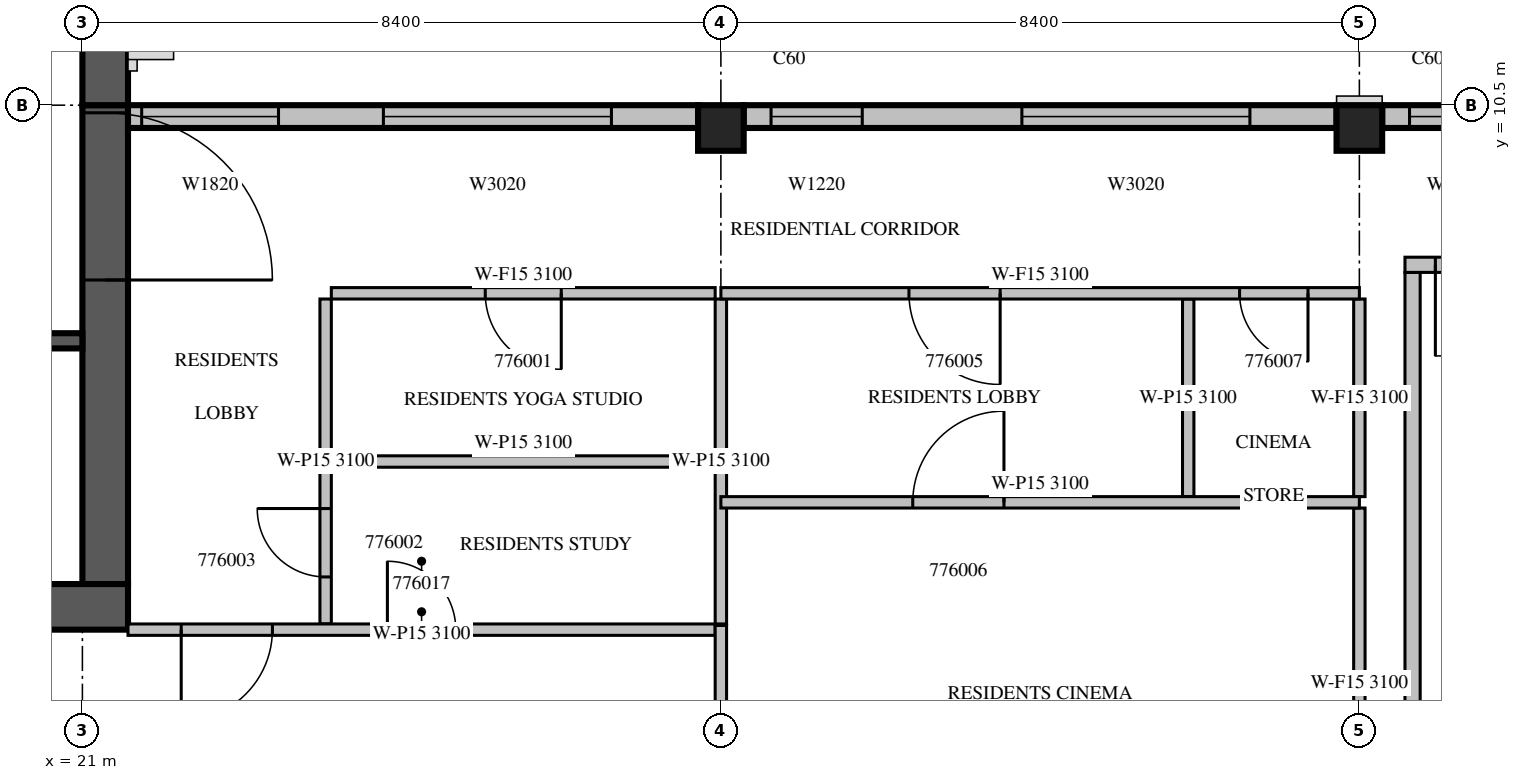
"""IFC4 building model, lengths in metres.
Left out: names, types, materials, properties, quantities, classifications, styles, units other than length and angle.
Written with IfcOpenShell. Run it as: python <this file> out.ifc"""

import sys

from ifc_helpers import new_model, si_unit, direction, frame, frame_2d, origin, origin_2d, place, context, subcontext, project, spatial, rectangle, extrude, source, transform, mapped, element, fill, save


model = new_model("IFC4")
c1 = context("Model", 3, precision=1e-05, world=origin(), true_north=direction((0.0, 1.0)))
c2 = subcontext(c1, "Body", "Model", "MODEL_VIEW")
j1 = project(units=[si_unit("LENGTHUNIT", "METRE"), si_unit("PLANEANGLEUNIT", "RADIAN")], contexts=[c1])
p1 = place(None, origin())
s1 = spatial("IfcSite", under=j1, at=p1, CompositionType="ELEMENT")
p2 = place(p1, origin())
s2 = spatial("IfcBuilding", under=s1, at=p2, CompositionType="ELEMENT")
p3 = place(p2, frame((0.0, 0.0, 326.5)))
s3 = spatial("IfcBuildingStorey", under=s2, at=p3, CompositionType="ELEMENT", Elevation=326.5)
m1 = source(origin(), c2, "Body", "SweptSolid", [
    extrude(rectangle(XDim=0.6, YDim=0.6, at=origin_2d()), origin(), (0.0, 0.0, 1.0), 3.5),
])
for number, where, z_axis, x_axis in (
    (1, (29.4, 10.2, 0.0), (0.0, 0.0, 1.0), (1.0, 0.0, 0.0)),
    (2, (37.8, 10.2, 0.0), (0.0, 0.0, 1.0), (1.0, 0.0, 0.0)),
):
    element("IfcColumn", number, at=place(p3, frame(where, z_axis=z_axis, x_axis=x_axis)), inside=s3, PredefinedType="COLUMN", context=c2, shape_type="MappedRepresentation", body=[
        mapped(m1, transform((0.0, 0.0, 0.0), scale=1.0)),
    ])
m2 = source(origin(), c2, "Body", "SweptSolid", [
    extrude(rectangle(XDim=6.3, YDim=0.6, at=frame_2d((3.15, 0.0))), origin(), (0.0, 0.0, 1.0), 3.5),
])
p4 = place(p3, frame((21.3, 4.2, 0.0), z_axis=(0.0, 0.0, 1.0), x_axis=(0.0, 1.0, 0.0)))
e3 = element("IfcWall", 3, at=p4, inside=s3, PredefinedType="SHEAR", context=c2, shape_type="MappedRepresentation", body=[
    mapped(m2, transform((0.0, 0.0, 0.0), scale=1.0)),
])
m3 = source(origin(), c2, "Body", "SweptSolid", [
    extrude(rectangle(XDim=2.2, YDim=2.1, at=frame_2d((1.1, 1.05))), frame((0.0, 0.31, 0.0), z_axis=(0.0, -1.0, 0.0), x_axis=(1.0, 0.0, 0.0)), (0.0, 0.0, 1.0), 0.62),
])
p5 = place(p4, frame((4.0, 0.0, 0.0)))
e4 = element("IfcOpeningElement", 4, at=p5, cuts=e3, PredefinedType="OPENING", context=c2, shape_type="MappedRepresentation", body=[
    mapped(m3, transform((0.0, 0.0, 0.0), scale=1.0)),
])
m4 = source(origin(), c2, "Body", "SweptSolid", [
    extrude(rectangle(XDim=17.4, YDim=0.6, at=frame_2d((8.7, 0.0))), origin(), (0.0, 0.0, 1.0), 3.5),
])
p6 = place(p3, frame((4.2, 3.9, 0.0), z_axis=(0.0, 0.0, 1.0), x_axis=(1.0, 0.0, 0.0)))
e5 = element("IfcWall", 5, at=p6, inside=s3, PredefinedType="SHEAR", context=c2, shape_type="MappedRepresentation", body=[
    mapped(m4, transform((0.0, 0.0, 0.0), scale=1.0)),
])
m5 = source(origin(), c2, "Body", "SweptSolid", [
    extrude(rectangle(XDim=0.9, YDim=2.1, at=frame_2d((0.45, 1.05))), frame((0.0, 0.31, 0.0), z_axis=(0.0, -1.0, 0.0), x_axis=(1.0, 0.0, 0.0)), (0.0, 0.0, 1.0), 0.62),
])
p7 = place(p6, frame((15.2, 0.0, 0.0)))
e6 = element("IfcOpeningElement", 6, at=p7, cuts=e5, PredefinedType="OPENING", context=c2, shape_type="MappedRepresentation", body=[
    mapped(m5, transform((0.0, 0.0, 0.0), scale=1.0)),
])
m6 = source(origin(), c2, "Body", "SweptSolid", [
    extrude(rectangle(XDim=10.5, YDim=0.6, at=frame_2d((5.25, 0.0))), origin(), (0.0, 0.0, 1.0), 3.5),
])
p8 = place(p3, frame((21.3, 10.5, 0.0), z_axis=(0.0, 0.0, 1.0), x_axis=(0.0, 1.0, 0.0)))
e7 = element("IfcWall", 7, at=p8, inside=s3, PredefinedType="SHEAR", context=c2, shape_type="MappedRepresentation", body=[
    mapped(m6, transform((0.0, 0.0, 0.0), scale=1.0)),
])
m7 = source(origin(), c2, "Body", "SweptSolid", [
    extrude(rectangle(XDim=1.2, YDim=2.4, at=frame_2d((0.6, 1.2))), frame((0.0, 0.31, 0.0), z_axis=(0.0, -1.0, 0.0), x_axis=(1.0, 0.0, 0.0)), (0.0, 0.0, 1.0), 0.62),
])
p9 = place(p8, frame((5.7, 0.0, 0.6)))
e8 = element("IfcOpeningElement", 8, at=p9, cuts=e7, PredefinedType="OPENING", context=c2, shape_type="MappedRepresentation", body=[
    mapped(m7, transform((0.0, 0.0, 0.0), scale=1.0)),
])
m8 = source(origin(), c2, "Body", "SweptSolid", [
    extrude(rectangle(XDim=7.8, YDim=0.3, at=frame_2d((3.9, 0.0))), origin(), (0.0, 0.0, 1.0), 3.1),
])
p10 = place(p3, frame((45.9, 10.35, 0.0), z_axis=(0.0, 0.0, 1.0), x_axis=(-1.0, 0.0, 0.0)))
e9 = element("IfcWall", 9, at=p10, inside=s3, PredefinedType="STANDARD", context=c2, shape_type="MappedRepresentation", body=[
    mapped(m8, transform((0.0, 0.0, 0.0), scale=1.0)),
])
m9 = source(origin(), c2, "Body", "SweptSolid", [
    extrude(rectangle(XDim=3.0, YDim=2.0, at=frame_2d((1.5, 1.0))), frame((0.0, 0.16, 0.0), z_axis=(0.0, -1.0, 0.0), x_axis=(1.0, 0.0, 0.0)), (0.0, 0.0, 1.0), 0.32),
])
p11 = place(p10, frame((1.14, 0.0, 0.6)))
e10 = element("IfcOpeningElement", 10, at=p11, cuts=e9, PredefinedType="OPENING", context=c2, shape_type="MappedRepresentation", body=[
    mapped(m9, transform((0.0, 0.0, 0.0), scale=1.0)),
])
m10 = source(origin(), c2, "Body", "SweptSolid", [
    extrude(rectangle(XDim=1.2, YDim=2.0, at=frame_2d((0.6, 1.0))), frame((0.0, 0.16, 0.0), z_axis=(0.0, -1.0, 0.0), x_axis=(1.0, 0.0, 0.0)), (0.0, 0.0, 1.0), 0.32),
])
p12 = place(p10, frame((6.24, 0.0, 0.6)))
e11 = element("IfcOpeningElement", 11, at=p12, cuts=e9, PredefinedType="OPENING", context=c2, shape_type="MappedRepresentation", body=[
    mapped(m10, transform((0.0, 0.0, 0.0), scale=1.0)),
])
p13 = place(p3, frame((37.5, 10.35, 0.0), z_axis=(0.0, 0.0, 1.0), x_axis=(-1.0, 0.0, 0.0)))
e12 = element("IfcWall", 12, at=p13, inside=s3, PredefinedType="STANDARD", context=c2, shape_type="MappedRepresentation", body=[
    mapped(m8, transform((0.0, 0.0, 0.0), scale=1.0)),
])
p14 = place(p13, frame((1.14, 0.0, 0.6)))
e13 = element("IfcOpeningElement", 13, at=p14, cuts=e12, PredefinedType="OPENING", context=c2, shape_type="MappedRepresentation", body=[
    mapped(m9, transform((0.0, 0.0, 0.0), scale=1.0)),
])
p15 = place(p13, frame((6.24, 0.0, 0.6)))
e14 = element("IfcOpeningElement", 14, at=p15, cuts=e12, PredefinedType="OPENING", context=c2, shape_type="MappedRepresentation", body=[
    mapped(m10, transform((0.0, 0.0, 0.0), scale=1.0)),
])
p16 = place(p3, frame((29.1, 10.35, 0.0), z_axis=(0.0, 0.0, 1.0), x_axis=(-1.0, 0.0, 0.0)))
e15 = element("IfcWall", 15, at=p16, inside=s3, PredefinedType="STANDARD", context=c2, shape_type="SweptSolid", body=[
    extrude(rectangle(XDim=7.5, YDim=0.3, at=frame_2d((3.75, 0.0))), origin(), (0.0, 0.0, 1.0), 3.1),
])
p17 = place(p16, frame((1.14, 0.0, 0.6)))
e16 = element("IfcOpeningElement", 16, at=p17, cuts=e15, PredefinedType="OPENING", context=c2, shape_type="MappedRepresentation", body=[
    mapped(m9, transform((0.0, 0.0, 0.0), scale=1.0)),
])
m11 = source(origin(), c2, "Body", "SweptSolid", [
    extrude(rectangle(XDim=1.8, YDim=2.0, at=frame_2d((0.9, 1.0))), frame((0.0, 0.16, 0.0), z_axis=(0.0, -1.0, 0.0), x_axis=(1.0, 0.0, 0.0)), (0.0, 0.0, 1.0), 0.32),
])
p18 = place(p16, frame((5.52, 0.0, 0.6)))
e17 = element("IfcOpeningElement", 17, at=p18, cuts=e15, PredefinedType="OPENING", context=c2, shape_type="MappedRepresentation", body=[
    mapped(m11, transform((0.0, 0.0, 0.0), scale=1.0)),
])
m12 = source(origin(), c2, "Body", "SweptSolid", [
    extrude(rectangle(XDim=7.2, YDim=0.2, at=frame_2d((3.6, 0.0))), origin(), (0.0, 0.0, 1.0), 3.1),
])
p19 = place(p3, frame((13.8, 7.4, 0.0), z_axis=(0.0, 0.0, 1.0), x_axis=(1.0, 0.0, 0.0)))
e18 = element("IfcWall", 18, at=p19, inside=s3, PredefinedType="SOLIDWALL", context=c2, shape_type="MappedRepresentation", body=[
    mapped(m12, transform((0.0, 0.0, 0.0), scale=1.0)),
])
m13 = source(origin(), c2, "Body", "SweptSolid", [
    extrude(rectangle(XDim=0.9, YDim=2.1, at=frame_2d((0.45, 1.05))), frame((0.0, 0.11, 0.0), z_axis=(0.0, -1.0, 0.0), x_axis=(1.0, 0.0, 0.0)), (0.0, 0.0, 1.0), 0.22),
])
p20 = place(p19, frame((0.75, 0.0, 0.0)))
e19 = element("IfcOpeningElement", 19, at=p20, cuts=e18, PredefinedType="OPENING", context=c2, shape_type="MappedRepresentation", body=[
    mapped(m13, transform((0.0, 0.0, 0.0), scale=1.0)),
])
p21 = place(p19, frame((3.15, 0.0, 0.0)))
e20 = element("IfcOpeningElement", 20, at=p21, cuts=e18, PredefinedType="OPENING", context=c2, shape_type="MappedRepresentation", body=[
    mapped(m13, transform((0.0, 0.0, 0.0), scale=1.0)),
])
p22 = place(p19, frame((5.55, 0.0, 0.0)))
e21 = element("IfcOpeningElement", 21, at=p22, cuts=e18, PredefinedType="OPENING", context=c2, shape_type="MappedRepresentation", body=[
    mapped(m13, transform((0.0, 0.0, 0.0), scale=1.0)),
])
m14 = source(origin(), c2, "Body", "SweptSolid", [
    extrude(rectangle(XDim=8.0, YDim=0.2, at=frame_2d((4.0, 0.0))), origin(), (0.0, 0.0, 1.0), 3.1),
])
p23 = place(p3, frame((38.5, 0.3, 0.0), z_axis=(0.0, 0.0, 1.0), x_axis=(0.0, 1.0, 0.0)))
e22 = element("IfcWall", 22, at=p23, inside=s3, PredefinedType="PARTITIONING", context=c2, shape_type="MappedRepresentation", body=[
    mapped(m14, transform((0.0, 0.0, 0.0), scale=1.0)),
])
m15 = source(origin(), c2, "Body", "SweptSolid", [
    extrude(rectangle(XDim=5.45, YDim=0.2, at=frame_2d((2.725, 0.0))), origin(), (0.0, 0.0, 1.0), 3.1),
])
p24 = place(p3, frame((38.4, 8.4, 0.0), z_axis=(0.0, 0.0, 1.0), x_axis=(1.0, 0.0, 0.0)))
e23 = element("IfcWall", 23, at=p24, inside=s3, PredefinedType="PARTITIONING", context=c2, shape_type="MappedRepresentation", body=[
    mapped(m15, transform((0.0, 0.0, 0.0), scale=1.0)),
])
m16 = source(origin(), c2, "Body", "SweptSolid", [
    extrude(rectangle(XDim=1.2, YDim=2.1, at=frame_2d((0.6, 1.05))), frame((0.0, 0.11, 0.0), z_axis=(0.0, -1.0, 0.0), x_axis=(1.0, 0.0, 0.0)), (0.0, 0.0, 1.0), 0.22),
])
p25 = place(p24, frame((0.4, 0.0, 0.0)))
e24 = element("IfcOpeningElement", 24, at=p25, cuts=e23, PredefinedType="OPENING", context=c2, shape_type="MappedRepresentation", body=[
    mapped(m16, transform((0.0, 0.0, 0.0), scale=1.0)),
])
p26 = place(p24, frame((3.25, 0.0, 0.0)))
e25 = element("IfcOpeningElement", 25, at=p26, cuts=e23, PredefinedType="OPENING", context=c2, shape_type="MappedRepresentation", body=[
    mapped(m13, transform((0.0, 0.0, 0.0), scale=1.0)),
])
m17 = source(origin(), c2, "Body", "SweptSolid", [
    extrude(rectangle(XDim=4.275, YDim=0.15, at=frame_2d((2.138, 0.0))), origin(), (0.0, 0.0, 1.0), 3.1),
])
p27 = place(p3, frame((24.2, 7.95, 0.0), z_axis=(0.0, 0.0, 1.0), x_axis=(0.0, -1.0, 0.0)))
e26 = element("IfcWall", 26, at=p27, inside=s3, PredefinedType="PARTITIONING", context=c2, shape_type="MappedRepresentation", body=[
    mapped(m17, transform((0.0, 0.0, 0.0), scale=1.0)),
])
m18 = source(origin(), c2, "Body", "SweptSolid", [
    extrude(rectangle(XDim=0.9, YDim=2.1, at=frame_2d((0.45, 1.05))), frame((0.0, 0.085, 0.0), z_axis=(0.0, -1.0, 0.0), x_axis=(1.0, 0.0, 0.0)), (0.0, 0.0, 1.0), 0.17),
])
p28 = place(p27, frame((2.756, 0.0, 0.0)))
e27 = element("IfcOpeningElement", 27, at=p28, cuts=e26, PredefinedType="OPENING", context=c2, shape_type="MappedRepresentation", body=[
    mapped(m18, transform((0.0, 0.0, 0.0), scale=1.0)),
])
p29 = place(p3, frame((29.4, 3.675, 0.0), z_axis=(0.0, 0.0, 1.0), x_axis=(0.0, 1.0, 0.0)))
e28 = element("IfcWall", 28, at=p29, inside=s3, PredefinedType="PARTITIONING", context=c2, shape_type="MappedRepresentation", body=[
    mapped(m17, transform((0.0, 0.0, 0.0), scale=1.0)),
])
m19 = source(origin(), c2, "Body", "SweptSolid", [
    extrude(rectangle(XDim=5.05, YDim=0.15, at=frame_2d((2.525, 0.0))), origin(), (0.0, 0.0, 1.0), 3.1),
])
p30 = place(p3, frame((29.325, 8.025, 0.0), z_axis=(0.0, 0.0, 1.0), x_axis=(-1.0, 0.0, 0.0)))
e29 = element("IfcWall", 29, at=p30, inside=s3, PredefinedType="PARTITIONING", context=c2, shape_type="MappedRepresentation", body=[
    mapped(m19, transform((0.0, 0.0, 0.0), scale=1.0)),
])
m20 = source(origin(), c2, "Body", "SweptSolid", [
    extrude(rectangle(XDim=1.0, YDim=2.1, at=frame_2d((0.5, 1.05))), frame((0.0, 0.085, 0.0), z_axis=(0.0, -1.0, 0.0), x_axis=(1.0, 0.0, 0.0)), (0.0, 0.0, 1.0), 0.17),
])
p31 = place(p30, frame((2.025, 0.0, 0.0)))
e30 = element("IfcOpeningElement", 30, at=p31, cuts=e29, PredefinedType="OPENING", context=c2, shape_type="MappedRepresentation", body=[
    mapped(m20, transform((0.0, 0.0, 0.0), scale=1.0)),
])
p32 = place(p3, frame((29.325, 5.812, 0.0), z_axis=(0.0, 0.0, 1.0), x_axis=(-1.0, 0.0, 0.0)))
e31 = element("IfcWall", 31, at=p32, inside=s3, PredefinedType="PARTITIONING", context=c2, shape_type="MappedRepresentation", body=[
    mapped(m19, transform((0.0, 0.0, 0.0), scale=1.0)),
])
m21 = source(origin(), c2, "Body", "SweptSolid", [
    extrude(rectangle(XDim=7.725, YDim=0.15, at=frame_2d((3.862, 0.0))), origin(), (0.0, 0.0, 1.0), 3.1),
])
p33 = place(p3, frame((21.6, 3.6, 0.0), z_axis=(0.0, 0.0, 1.0), x_axis=(1.0, 0.0, 0.0)))
e32 = element("IfcWall", 32, at=p33, inside=s3, PredefinedType="PARTITIONING", context=c2, shape_type="MappedRepresentation", body=[
    mapped(m21, transform((0.0, 0.0, 0.0), scale=1.0)),
])
m22 = source(origin(), c2, "Body", "SweptSolid", [
    extrude(rectangle(XDim=1.2, YDim=2.1, at=frame_2d((0.6, 1.05))), frame((0.0, 0.085, 0.0), z_axis=(0.0, -1.0, 0.0), x_axis=(1.0, 0.0, 0.0)), (0.0, 0.0, 1.0), 0.17),
])
p34 = place(p33, frame((0.7, 0.0, 0.0)))
e33 = element("IfcOpeningElement", 33, at=p34, cuts=e32, PredefinedType="OPENING", context=c2, shape_type="MappedRepresentation", body=[
    mapped(m22, transform((0.0, 0.0, 0.0), scale=1.0)),
])
p35 = place(p33, frame((3.413, 0.0, 0.0)))
e34 = element("IfcOpeningElement", 34, at=p35, cuts=e32, PredefinedType="OPENING", context=c2, shape_type="MappedRepresentation", body=[
    mapped(m18, transform((0.0, 0.0, 0.0), scale=1.0)),
])
m23 = source(origin(), c2, "Body", "SweptSolid", [
    extrude(rectangle(XDim=2.6, YDim=0.15, at=frame_2d((1.3, 0.0))), origin(), (0.0, 0.0, 1.0), 3.1),
])
p36 = place(p3, frame((35.548, 5.35, 0.0), z_axis=(0.0, 0.0, 1.0), x_axis=(0.0, 1.0, 0.0)))
e35 = element("IfcWall", 35, at=p36, inside=s3, PredefinedType="PARTITIONING", context=c2, shape_type="MappedRepresentation", body=[
    mapped(m23, transform((0.0, 0.0, 0.0), scale=1.0)),
])
p37 = place(p3, frame((29.4, 0.599, 0.0), z_axis=(0.0, 0.0, 1.0), x_axis=(0.0, 1.0, 0.0)))
e36 = element("IfcWall", 36, at=p37, inside=s3, PredefinedType="PARTITIONING", context=c2, shape_type="SweptSolid", body=[
    extrude(rectangle(XDim=3.056, YDim=0.15, at=frame_2d((1.528, 0.0))), origin(), (0.0, 0.0, 1.0), 3.1),
])
p38 = place(p3, frame((37.8, 0.599, 0.0), z_axis=(0.0, 0.0, 1.0), x_axis=(0.0, 1.0, 0.0)))
e37 = element("IfcWall", 37, at=p38, inside=s3, PredefinedType="PARTITIONING", context=c2, shape_type="SweptSolid", body=[
    extrude(rectangle(XDim=4.601, YDim=0.15, at=frame_2d((2.3, 0.0))), origin(), (0.0, 0.0, 1.0), 3.1),
])
p39 = place(p3, frame((37.8, 5.35, 0.0), z_axis=(0.0, 0.0, 1.0), x_axis=(0.0, 1.0, 0.0)))
e38 = element("IfcWall", 38, at=p39, inside=s3, PredefinedType="PARTITIONING", context=c2, shape_type="MappedRepresentation", body=[
    mapped(m23, transform((0.0, 0.0, 0.0), scale=1.0)),
])
m24 = source(origin(), c2, "Body", "SweptSolid", [
    extrude(rectangle(XDim=8.4, YDim=0.15, at=frame_2d((4.2, 0.0))), origin(), (0.0, 0.0, 1.0), 3.1),
])
p40 = place(p3, frame((37.8, 5.275, 0.0), z_axis=(0.0, 0.0, 1.0), x_axis=(-1.0, 0.0, 0.0)))
e39 = element("IfcWall", 39, at=p40, inside=s3, PredefinedType="PARTITIONING", context=c2, shape_type="MappedRepresentation", body=[
    mapped(m24, transform((0.0, 0.0, 0.0), scale=1.0)),
])
p41 = place(p40, frame((4.676, 0.0, 0.0)))
e40 = element("IfcOpeningElement", 40, at=p41, cuts=e39, PredefinedType="OPENING", context=c2, shape_type="MappedRepresentation", body=[
    mapped(m22, transform((0.0, 0.0, 0.0), scale=1.0)),
])
p42 = place(p3, frame((37.8, 8.025, 0.0), z_axis=(0.0, 0.0, 1.0), x_axis=(-1.0, 0.0, 0.0)))
e41 = element("IfcWall", 41, at=p42, inside=s3, PredefinedType="PARTITIONING", context=c2, shape_type="MappedRepresentation", body=[
    mapped(m24, transform((0.0, 0.0, 0.0), scale=1.0)),
])
p43 = place(p42, frame((4.726, 0.0, 0.0)))
e42 = element("IfcOpeningElement", 42, at=p43, cuts=e41, PredefinedType="OPENING", context=c2, shape_type="MappedRepresentation", body=[
    mapped(m22, transform((0.0, 0.0, 0.0), scale=1.0)),
])
p44 = place(p42, frame((0.676, 0.0, 0.0)))
e43 = element("IfcOpeningElement", 43, at=p44, cuts=e41, PredefinedType="OPENING", context=c2, shape_type="MappedRepresentation", body=[
    mapped(m18, transform((0.0, 0.0, 0.0), scale=1.0)),
])
m25 = source(origin(), c2, "Body", "SweptSolid", [
    extrude(rectangle(XDim=1.2, YDim=2.0, at=frame_2d((0.6, 1.0))), frame((0.0, 0.03, 0.0), z_axis=(0.0, -1.0, 0.0), x_axis=(1.0, 0.0, 0.0)), (0.0, 0.0, 1.0), 0.06),
])
p45 = place(p12, origin())
e44 = element("IfcWindow", 44, at=p45, inside=s3, PartitioningType="SINGLE_PANEL", PredefinedType="WINDOW", context=c2, shape_type="MappedRepresentation", body=[
    mapped(m25, transform((0.0, 0.0, 0.0), scale=1.0)),
])
fill(e11, e44)
m26 = source(origin(), c2, "Body", "SweptSolid", [
    extrude(rectangle(XDim=3.0, YDim=2.0, at=frame_2d((1.5, 1.0))), frame((0.0, 0.03, 0.0), z_axis=(0.0, -1.0, 0.0), x_axis=(1.0, 0.0, 0.0)), (0.0, 0.0, 1.0), 0.06),
])
p46 = place(p14, origin())
e45 = element("IfcWindow", 45, at=p46, inside=s3, PartitioningType="SINGLE_PANEL", PredefinedType="WINDOW", context=c2, shape_type="MappedRepresentation", body=[
    mapped(m26, transform((0.0, 0.0, 0.0), scale=1.0)),
])
fill(e13, e45)
p47 = place(p15, origin())
e46 = element("IfcWindow", 46, at=p47, inside=s3, PartitioningType="SINGLE_PANEL", PredefinedType="WINDOW", context=c2, shape_type="MappedRepresentation", body=[
    mapped(m25, transform((0.0, 0.0, 0.0), scale=1.0)),
])
fill(e14, e46)
p48 = place(p17, origin())
e47 = element("IfcWindow", 47, at=p48, inside=s3, PartitioningType="SINGLE_PANEL", PredefinedType="WINDOW", context=c2, shape_type="MappedRepresentation", body=[
    mapped(m26, transform((0.0, 0.0, 0.0), scale=1.0)),
])
fill(e16, e47)
m27 = source(origin(), c2, "Body", "SweptSolid", [
    extrude(rectangle(XDim=1.8, YDim=2.0, at=frame_2d((0.9, 1.0))), frame((0.0, 0.03, 0.0), z_axis=(0.0, -1.0, 0.0), x_axis=(1.0, 0.0, 0.0)), (0.0, 0.0, 1.0), 0.06),
])
p49 = place(p18, origin())
e48 = element("IfcWindow", 48, at=p49, inside=s3, PartitioningType="SINGLE_PANEL", PredefinedType="WINDOW", context=c2, shape_type="MappedRepresentation", body=[
    mapped(m27, transform((0.0, 0.0, 0.0), scale=1.0)),
])
fill(e17, e48)
m28 = source(origin(), c2, "Body", "SweptSolid", [
    extrude(rectangle(XDim=1.2, YDim=2.1, at=frame_2d((0.6, 1.05))), frame((0.0, 0.025, 0.0), z_axis=(0.0, -1.0, 0.0), x_axis=(1.0, 0.0, 0.0)), (0.0, 0.0, 1.0), 0.05),
])
p50 = place(p25, origin())
e49 = element("IfcDoor", 49, at=p50, inside=s3, OperationType="SINGLE_SWING_RIGHT", PredefinedType="DOOR", context=c2, shape_type="MappedRepresentation", body=[
    mapped(m28, transform((0.0, 0.0, 0.0), scale=1.0)),
])
fill(e24, e49)
m29 = source(origin(), c2, "Body", "SweptSolid", [
    extrude(rectangle(XDim=2.2, YDim=2.1, at=frame_2d((1.1, 1.05))), frame((0.0, 0.025, 0.0), z_axis=(0.0, -1.0, 0.0), x_axis=(1.0, 0.0, 0.0)), (0.0, 0.0, 1.0), 0.05),
])
p51 = place(p5, origin())
e50 = element("IfcDoor", 50, at=p51, inside=s3, OperationType="DOUBLE_DOOR_SINGLE_SWING", PredefinedType="DOOR", context=c2, shape_type="MappedRepresentation", body=[
    mapped(m29, transform((0.0, 0.0, 0.0), scale=1.0)),
])
fill(e4, e50)
m30 = source(origin(), c2, "Body", "SweptSolid", [
    extrude(rectangle(XDim=1.0, YDim=2.1, at=frame_2d((0.5, 1.05))), frame((0.0, 0.025, 0.0), z_axis=(0.0, -1.0, 0.0), x_axis=(1.0, 0.0, 0.0)), (0.0, 0.0, 1.0), 0.05),
])
p52 = place(p31, origin())
e51 = element("IfcDoor", 51, at=p52, inside=s3, OperationType="SINGLE_SWING_LEFT", PredefinedType="DOOR", context=c2, shape_type="MappedRepresentation", body=[
    mapped(m30, transform((0.0, 0.0, 0.0), scale=1.0)),
])
fill(e30, e51)
m31 = source(origin(), c2, "Body", "SweptSolid", [
    extrude(rectangle(XDim=0.9, YDim=2.1, at=frame_2d((0.45, 1.05))), frame((0.0, 0.025, 0.0), z_axis=(0.0, -1.0, 0.0), x_axis=(1.0, 0.0, 0.0)), (0.0, 0.0, 1.0), 0.05),
])
p53 = place(p28, origin())
e52 = element("IfcDoor", 52, at=p53, inside=s3, OperationType="SINGLE_SWING_RIGHT", PredefinedType="DOOR", context=c2, shape_type="MappedRepresentation", body=[
    mapped(m31, transform((0.0, 0.0, 0.0), scale=1.0)),
])
fill(e27, e52)
p54 = place(p34, origin())
e53 = element("IfcDoor", 53, at=p54, inside=s3, OperationType="SINGLE_SWING_RIGHT", PredefinedType="DOOR", context=c2, shape_type="MappedRepresentation", body=[
    mapped(m28, transform((0.0, 0.0, 0.0), scale=1.0)),
])
fill(e33, e53)
p55 = place(p43, origin())
e54 = element("IfcDoor", 54, at=p55, inside=s3, OperationType="SINGLE_SWING_LEFT", PredefinedType="DOOR", context=c2, shape_type="MappedRepresentation", body=[
    mapped(m28, transform((0.0, 0.0, 0.0), scale=1.0)),
])
fill(e42, e54)
p56 = place(p41, origin())
e55 = element("IfcDoor", 55, at=p56, inside=s3, OperationType="SINGLE_SWING_RIGHT", PredefinedType="DOOR", context=c2, shape_type="MappedRepresentation", body=[
    mapped(m28, transform((0.0, 0.0, 0.0), scale=1.0)),
])
fill(e40, e55)
p57 = place(p44, origin())
e56 = element("IfcDoor", 56, at=p57, inside=s3, OperationType="SINGLE_SWING_LEFT", PredefinedType="DOOR", context=c2, shape_type="MappedRepresentation", body=[
    mapped(m31, transform((0.0, 0.0, 0.0), scale=1.0)),
])
fill(e43, e56)
p58 = place(p35, origin())
e57 = element("IfcDoor", 57, at=p58, inside=s3, OperationType="SINGLE_SWING_LEFT", PredefinedType="DOOR", context=c2, shape_type="MappedRepresentation", body=[
    mapped(m31, transform((0.0, 0.0, 0.0), scale=1.0)),
])
fill(e34, e57)
save(model, sys.argv[1])
